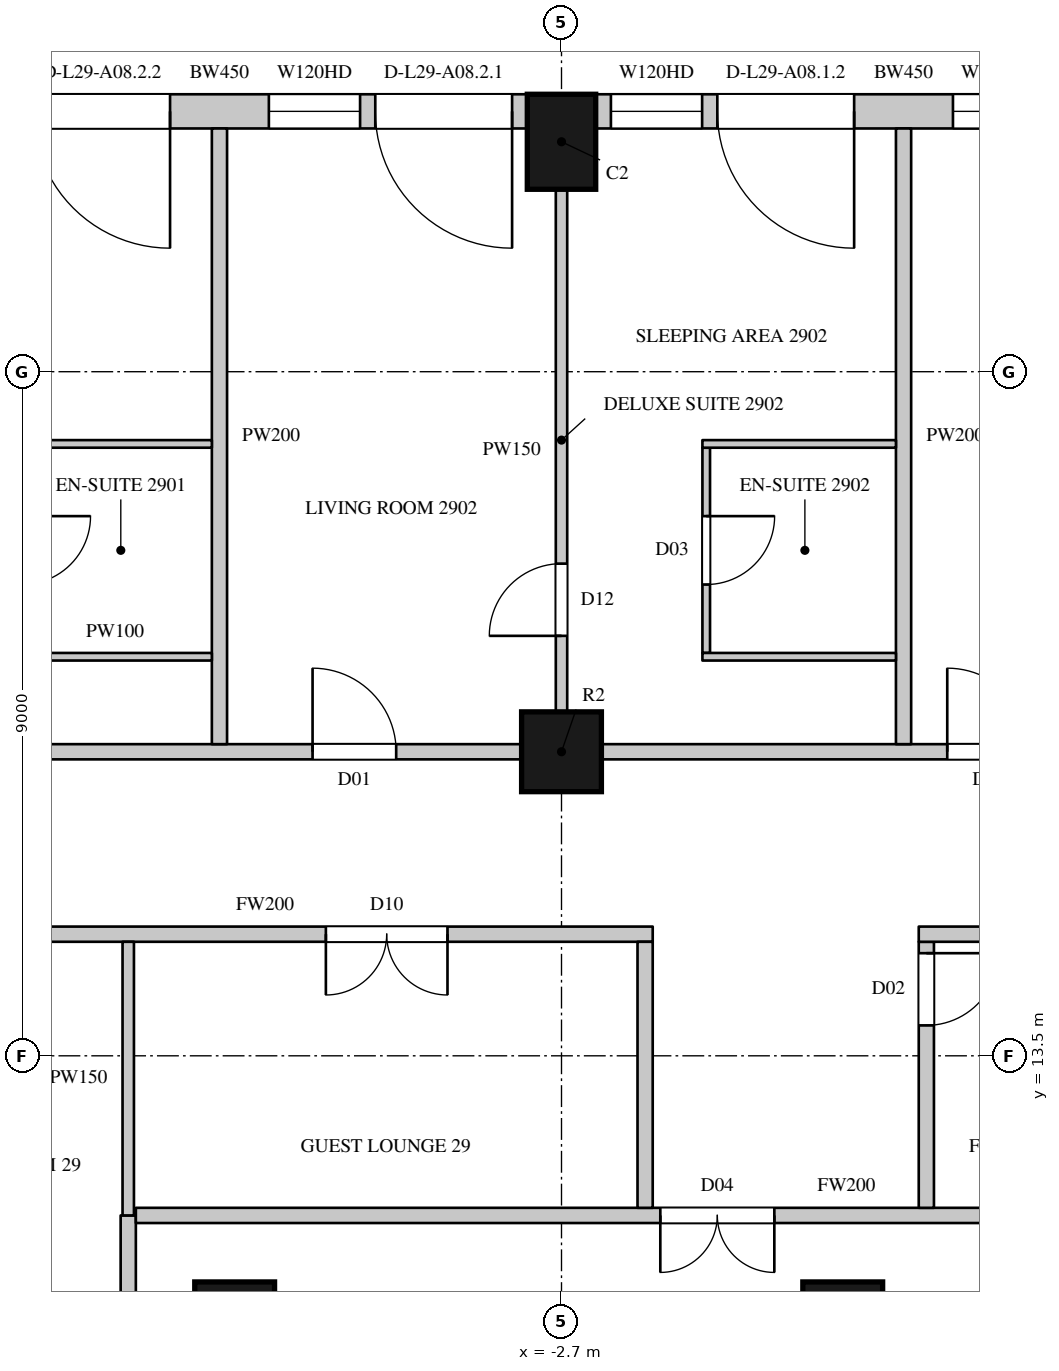
"""IFC4 building model, lengths in metres.
Left out: names, types, materials, properties, quantities, classifications, styles, units other than length and angle.
Written with IfcOpenShell. Run it as: python <this file> out.ifc"""

import sys

from ifc_helpers import new_model, si_unit, direction, frame, frame_2d, origin, origin_2d, place, context, subcontext, project, spatial, rectangle, circle, extrude, element, fill, save


model = new_model("IFC4")
c1 = context("Model", 3, precision=1e-05, world=origin(), true_north=direction((0.0, 1.0)))
c2 = subcontext(c1, "Body", "Model", "MODEL_VIEW")
j1 = project(units=[si_unit("LENGTHUNIT", "METRE"), si_unit("PLANEANGLEUNIT", "RADIAN")], contexts=[c1])
p1 = place(None, origin())
s1 = spatial("IfcSite", under=j1, at=p1, CompositionType="ELEMENT")
p2 = place(p1, origin())
s2 = spatial("IfcBuilding", under=s1, at=p2, CompositionType="ELEMENT")
p3 = place(p2, frame((0.0, 0.0, 134.7)))
s3 = spatial("IfcBuildingStorey", under=s2, at=p3, CompositionType="ELEMENT", Elevation=134.7)
p4 = place(p3, frame((-2.7, 25.525, 0.0), z_axis=(0.0, 0.0, 1.0), x_axis=(-1.0, 0.0, 0.0)))
e1 = element("IfcColumn", 1, at=p4, inside=s3, PredefinedType="COLUMN", context=c2, shape_type="SweptSolid", body=[
    extrude(rectangle(XDim=0.9, YDim=1.25, at=origin_2d()), origin(), (0.0, 0.0, 1.0), 3.6),
])
for number, where, z_axis, x_axis in (
    (2, (-2.7, 17.5, 0.0), (0.0, 0.0, 1.0), (1.0, 0.0, 0.0)),
    (3, (-7.0, 10.0, 0.0), (0.0, 0.0, 1.0), (1.0, 0.0, 0.0)),
    (4, (1.0, 10.0, 0.0), (0.0, 0.0, 1.0), (1.0, 0.0, 0.0)),
):
    element("IfcColumn", number, at=place(p3, frame(where, z_axis=z_axis, x_axis=x_axis)), inside=s3, PredefinedType="COLUMN", context=c2, shape_type="SweptSolid", body=[
        extrude(circle(Radius=0.525, at=origin_2d()), origin(), (0.0, 0.0, 1.0), 3.6),
    ])
p5 = place(p3, frame((5.85, 25.925, 0.0), z_axis=(0.0, 0.0, 1.0), x_axis=(-1.0, 0.0, 0.0)))
e5 = element("IfcWall", 5, at=p5, inside=s3, PredefinedType="SOLIDWALL", context=c2, shape_type="SweptSolid", body=[
    extrude(rectangle(XDim=8.1, YDim=0.45, at=frame_2d((4.05, 0.0))), origin(), (0.0, 0.0, 1.0), 3.3),
])
p6 = place(p5, frame((0.2, 0.0, 0.0)))
e6 = element("IfcOpeningElement", 6, at=p6, cuts=e5, PredefinedType="OPENING", context=c2, shape_type="SweptSolid", body=[
    extrude(rectangle(XDim=1.8, YDim=2.4, at=frame_2d((0.9, 1.2))), frame((0.0, 0.235, 0.0), z_axis=(0.0, -1.0, 0.0), x_axis=(1.0, 0.0, 0.0)), (0.0, 0.0, 1.0), 0.47),
])
p7 = place(p5, frame((2.2, 0.0, 1.05)))
e7 = element("IfcOpeningElement", 7, at=p7, cuts=e5, PredefinedType="OPENING", context=c2, shape_type="SweptSolid", body=[
    extrude(rectangle(XDim=1.2, YDim=2.0, at=frame_2d((0.6, 1.0))), frame((0.0, 0.235, 0.0), z_axis=(0.0, -1.0, 0.0), x_axis=(1.0, 0.0, 0.0)), (0.0, 0.0, 1.0), 0.47),
])
p8 = place(p5, frame((4.7, 0.0, 0.0)))
e8 = element("IfcOpeningElement", 8, at=p8, cuts=e5, PredefinedType="OPENING", context=c2, shape_type="SweptSolid", body=[
    extrude(rectangle(XDim=1.8, YDim=2.4, at=frame_2d((0.9, 1.2))), frame((0.0, 0.235, 0.0), z_axis=(0.0, -1.0, 0.0), x_axis=(1.0, 0.0, 0.0)), (0.0, 0.0, 1.0), 0.47),
])
p9 = place(p5, frame((6.7, 0.0, 1.05)))
e9 = element("IfcOpeningElement", 9, at=p9, cuts=e5, PredefinedType="OPENING", context=c2, shape_type="SweptSolid", body=[
    extrude(rectangle(XDim=1.2, YDim=2.0, at=frame_2d((0.6, 1.0))), frame((0.0, 0.235, 0.0), z_axis=(0.0, -1.0, 0.0), x_axis=(1.0, 0.0, 0.0)), (0.0, 0.0, 1.0), 0.47),
])
p10 = place(p3, frame((-3.15, 25.925, 0.0), z_axis=(0.0, 0.0, 1.0), x_axis=(-1.0, 0.0, 0.0)))
e10 = element("IfcWall", 10, at=p10, inside=s3, PredefinedType="SOLIDWALL", context=c2, shape_type="SweptSolid", body=[
    extrude(rectangle(XDim=8.1, YDim=0.45, at=frame_2d((4.05, 0.0))), origin(), (0.0, 0.0, 1.0), 3.3),
])
p11 = place(p10, frame((0.2, 0.0, 0.0)))
e11 = element("IfcOpeningElement", 11, at=p11, cuts=e10, PredefinedType="OPENING", context=c2, shape_type="SweptSolid", body=[
    extrude(rectangle(XDim=1.8, YDim=2.4, at=frame_2d((0.9, 1.2))), frame((0.0, 0.235, 0.0), z_axis=(0.0, -1.0, 0.0), x_axis=(1.0, 0.0, 0.0)), (0.0, 0.0, 1.0), 0.47),
])
p12 = place(p10, frame((2.2, 0.0, 1.05)))
e12 = element("IfcOpeningElement", 12, at=p12, cuts=e10, PredefinedType="OPENING", context=c2, shape_type="SweptSolid", body=[
    extrude(rectangle(XDim=1.2, YDim=2.0, at=frame_2d((0.6, 1.0))), frame((0.0, 0.235, 0.0), z_axis=(0.0, -1.0, 0.0), x_axis=(1.0, 0.0, 0.0)), (0.0, 0.0, 1.0), 0.47),
])
p13 = place(p10, frame((4.7, 0.0, 0.0)))
e13 = element("IfcOpeningElement", 13, at=p13, cuts=e10, PredefinedType="OPENING", context=c2, shape_type="SweptSolid", body=[
    extrude(rectangle(XDim=1.8, YDim=2.4, at=frame_2d((0.9, 1.2))), frame((0.0, 0.235, 0.0), z_axis=(0.0, -1.0, 0.0), x_axis=(1.0, 0.0, 0.0)), (0.0, 0.0, 1.0), 0.47),
])
p14 = place(p10, frame((6.7, 0.0, 1.05)))
e14 = element("IfcOpeningElement", 14, at=p14, cuts=e10, PredefinedType="OPENING", context=c2, shape_type="SweptSolid", body=[
    extrude(rectangle(XDim=1.2, YDim=2.0, at=frame_2d((0.6, 1.0))), frame((0.0, 0.235, 0.0), z_axis=(0.0, -1.0, 0.0), x_axis=(1.0, 0.0, 0.0)), (0.0, 0.0, 1.0), 0.47),
])
p15 = place(p3, frame((-11.175, 17.5, 0.0), z_axis=(0.0, 0.0, 1.0), x_axis=(1.0, 0.0, 0.0)))
e15 = element("IfcWall", 15, at=p15, inside=s3, PredefinedType="PARTITIONING", context=c2, shape_type="SweptSolid", body=[
    extrude(rectangle(XDim=7.95, YDim=0.2, at=frame_2d((3.975, 0.0))), origin(), (0.0, 0.0, 1.0), 2.75),
])
p16 = place(p15, frame((5.2, 0.0, 0.0)))
e16 = element("IfcOpeningElement", 16, at=p16, cuts=e15, PredefinedType="OPENING", context=c2, shape_type="SweptSolid", body=[
    extrude(rectangle(XDim=1.1, YDim=2.4, at=frame_2d((0.55, 1.2))), frame((0.0, 0.11, 0.0), z_axis=(0.0, -1.0, 0.0), x_axis=(1.0, 0.0, 0.0)), (0.0, 0.0, 1.0), 0.22),
])
p17 = place(p3, frame((-2.175, 17.5, 0.0), z_axis=(0.0, 0.0, 1.0), x_axis=(1.0, 0.0, 0.0)))
e17 = element("IfcWall", 17, at=p17, inside=s3, PredefinedType="PARTITIONING", context=c2, shape_type="SweptSolid", body=[
    extrude(rectangle(XDim=7.95, YDim=0.2, at=frame_2d((3.975, 0.0))), origin(), (0.0, 0.0, 1.0), 2.75),
])
p18 = place(p17, frame((4.55, 0.0, 0.0)))
e18 = element("IfcOpeningElement", 18, at=p18, cuts=e17, PredefinedType="OPENING", context=c2, shape_type="SweptSolid", body=[
    extrude(rectangle(XDim=1.1, YDim=2.4, at=frame_2d((0.55, 1.2))), frame((0.0, 0.11, 0.0), z_axis=(0.0, -1.0, 0.0), x_axis=(1.0, 0.0, 0.0)), (0.0, 0.0, 1.0), 0.22),
])
p19 = place(p3, frame((-11.7, 15.1, 0.0), z_axis=(0.0, 0.0, 1.0), x_axis=(1.0, 0.0, 0.0)))
e19 = element("IfcWall", 19, at=p19, inside=s3, PredefinedType="PARTITIONING", context=c2, shape_type="SweptSolid", body=[
    extrude(rectangle(XDim=10.2, YDim=0.2, at=frame_2d((5.1, 0.0))), origin(), (0.0, 0.0, 1.0), 3.3),
])
p20 = place(p19, frame((5.9, 0.0, 0.0)))
e20 = element("IfcOpeningElement", 20, at=p20, cuts=e19, PredefinedType="OPENING", context=c2, shape_type="SweptSolid", body=[
    extrude(rectangle(XDim=1.6, YDim=2.4, at=frame_2d((0.8, 1.2))), frame((0.0, 0.11, 0.0), z_axis=(0.0, -1.0, 0.0), x_axis=(1.0, 0.0, 0.0)), (0.0, 0.0, 1.0), 0.22),
])
p21 = place(p3, frame((-8.4, -11.3, 0.0), z_axis=(0.0, 0.0, 1.0), x_axis=(0.0, 1.0, 0.0)))
e21 = element("IfcWall", 21, at=p21, inside=s3, PredefinedType="PARTITIONING", context=c2, shape_type="SweptSolid", body=[
    extrude(rectangle(XDim=22.7, YDim=0.2, at=frame_2d((11.35, 0.0))), origin(), (0.0, 0.0, 1.0), 3.3),
])
p22 = place(p21, frame((15.05, 0.0, 0.0)))
e22 = element("IfcOpeningElement", 22, at=p22, cuts=e21, PredefinedType="OPENING", context=c2, shape_type="SweptSolid", body=[
    extrude(rectangle(XDim=1.5, YDim=2.2, at=frame_2d((0.75, 1.1))), frame((0.0, 0.11, 0.0), z_axis=(0.0, -1.0, 0.0), x_axis=(1.0, 0.0, 0.0)), (0.0, 0.0, 1.0), 0.22),
])
p23 = place(p3, frame((-8.3, 11.4, 0.0), z_axis=(0.0, 0.0, 1.0), x_axis=(1.0, 0.0, 0.0)))
e23 = element("IfcWall", 23, at=p23, inside=s3, PredefinedType="PARTITIONING", context=c2, shape_type="SweptSolid", body=[
    extrude(rectangle(XDim=18.7, YDim=0.2, at=frame_2d((9.35, 0.0))), origin(), (0.0, 0.0, 1.0), 3.3),
])
p24 = place(p23, frame((6.9, 0.0, 0.0)))
e24 = element("IfcOpeningElement", 24, at=p24, cuts=e23, PredefinedType="OPENING", context=c2, shape_type="SweptSolid", body=[
    extrude(rectangle(XDim=1.5, YDim=2.2, at=frame_2d((0.75, 1.1))), frame((0.0, 0.11, 0.0), z_axis=(0.0, -1.0, 0.0), x_axis=(1.0, 0.0, 0.0)), (0.0, 0.0, 1.0), 0.22),
])
p25 = place(p3, frame((-1.6, 11.5, 0.0), z_axis=(0.0, 0.0, 1.0), x_axis=(0.0, 1.0, 0.0)))
e25 = element("IfcWall", 25, at=p25, inside=s3, PredefinedType="PARTITIONING", context=c2, shape_type="SweptSolid", body=[
    extrude(rectangle(XDim=3.5, YDim=0.2, at=frame_2d((1.75, 0.0))), origin(), (0.0, 0.0, 1.0), 3.3),
])
p26 = place(p3, frame((2.1, 11.5, 0.0), z_axis=(0.0, 0.0, 1.0), x_axis=(0.0, 1.0, 0.0)))
e26 = element("IfcWall", 26, at=p26, inside=s3, PredefinedType="PARTITIONING", context=c2, shape_type="SweptSolid", body=[
    extrude(rectangle(XDim=3.5, YDim=0.2, at=frame_2d((1.75, 0.0))), origin(), (0.0, 0.0, 1.0), 3.3),
])
p27 = place(p26, frame((2.4, 0.0, 0.0)))
e27 = element("IfcOpeningElement", 27, at=p27, cuts=e26, PredefinedType="OPENING", context=c2, shape_type="SweptSolid", body=[
    extrude(rectangle(XDim=0.95, YDim=2.2, at=frame_2d((0.475, 1.1))), frame((0.0, 0.11, 0.0), z_axis=(0.0, -1.0, 0.0), x_axis=(1.0, 0.0, 0.0)), (0.0, 0.0, 1.0), 0.22),
])
p28 = place(p3, frame((2.0, 15.1, 0.0), z_axis=(0.0, 0.0, 1.0), x_axis=(1.0, 0.0, 0.0)))
e28 = element("IfcWall", 28, at=p28, inside=s3, PredefinedType="PARTITIONING", context=c2, shape_type="SweptSolid", body=[
    extrude(rectangle(XDim=11.8, YDim=0.2, at=frame_2d((5.9, 0.0))), origin(), (0.0, 0.0, 1.0), 3.3),
])
p29 = place(p28, frame((7.1, 0.0, 0.0)))
e29 = element("IfcOpeningElement", 29, at=p29, cuts=e28, PredefinedType="OPENING", context=c2, shape_type="SweptSolid", body=[
    extrude(rectangle(XDim=0.9, YDim=2.2, at=frame_2d((0.45, 1.1))), frame((0.0, 0.11, 0.0), z_axis=(0.0, -1.0, 0.0), x_axis=(1.0, 0.0, 0.0)), (0.0, 0.0, 1.0), 0.22),
])
p30 = place(p3, frame((-8.4, 11.4, 0.0), z_axis=(0.0, 0.0, 1.0), x_axis=(0.0, 1.0, 0.0)))
e30 = element("IfcWall", 30, at=p30, inside=s3, PredefinedType="PARTITIONING", context=c2, shape_type="SweptSolid", body=[
    extrude(rectangle(XDim=3.6, YDim=0.15, at=frame_2d((1.8, 0.0))), origin(), (0.0, 0.0, 1.0), 3.3),
])
p31 = place(p3, frame((-2.7, 18.025, 0.0), z_axis=(0.0, 0.0, 1.0), x_axis=(0.0, 1.0, 0.0)))
e31 = element("IfcWall", 31, at=p31, inside=s3, PredefinedType="PARTITIONING", context=c2, shape_type="SweptSolid", body=[
    extrude(rectangle(XDim=6.875, YDim=0.15, at=frame_2d((3.438, 0.0))), origin(), (0.0, 0.0, 1.0), 2.75),
])
p32 = place(p31, frame((1.0, 0.0, 0.0)))
e32 = element("IfcOpeningElement", 32, at=p32, cuts=e31, PredefinedType="OPENING", context=c2, shape_type="SweptSolid", body=[
    extrude(rectangle(XDim=0.95, YDim=2.2, at=frame_2d((0.475, 1.1))), frame((0.0, 0.085, 0.0), z_axis=(0.0, -1.0, 0.0), x_axis=(1.0, 0.0, 0.0)), (0.0, 0.0, 1.0), 0.17),
])
for number, where, z_axis, x_axis in (
    (33, (-7.2, 17.6, 0.0), (0.0, 0.0, 1.0), (0.0, 1.0, 0.0)),
    (34, (1.8, 17.6, 0.0), (0.0, 0.0, 1.0), (0.0, 1.0, 0.0)),
):
    element("IfcWall", number, at=place(p3, frame(where, z_axis=z_axis, x_axis=x_axis)), inside=s3, PredefinedType="PARTITIONING", context=c2, shape_type="SweptSolid", body=[
        extrude(rectangle(XDim=8.1, YDim=0.2, at=frame_2d((4.05, 0.0))), origin(), (0.0, 0.0, 1.0), 2.65),
    ])
for number, where, z_axis, x_axis in (
    (35, (-9.846, 18.75, 0.0), (0.0, 0.0, 1.0), (1.0, 0.0, 0.0)),
    (36, (-9.846, 21.55, 0.0), (0.0, 0.0, 1.0), (1.0, 0.0, 0.0)),
):
    element("IfcWall", number, at=place(p3, frame(where, z_axis=z_axis, x_axis=x_axis)), inside=s3, PredefinedType="PARTITIONING", context=c2, shape_type="SweptSolid", body=[
        extrude(rectangle(XDim=2.546, YDim=0.1, at=frame_2d((1.273, 0.0))), origin(), (0.0, 0.0, 1.0), 3.3),
    ])
p33 = place(p3, frame((-0.796, 18.8, 0.0), z_axis=(0.0, 0.0, 1.0), x_axis=(0.0, 1.0, 0.0)))
e37 = element("IfcWall", 37, at=p33, inside=s3, PredefinedType="PARTITIONING", context=c2, shape_type="SweptSolid", body=[
    extrude(rectangle(XDim=2.7, YDim=0.1, at=frame_2d((1.35, 0.0))), origin(), (0.0, 0.0, 1.0), 3.3),
])
p34 = place(p33, frame((0.9, 0.0, 0.0)))
e38 = element("IfcOpeningElement", 38, at=p34, cuts=e37, PredefinedType="OPENING", context=c2, shape_type="SweptSolid", body=[
    extrude(rectangle(XDim=0.9, YDim=2.2, at=frame_2d((0.45, 1.1))), frame((0.0, 0.06, 0.0), z_axis=(0.0, -1.0, 0.0), x_axis=(1.0, 0.0, 0.0)), (0.0, 0.0, 1.0), 0.12),
])
for number, where, z_axis, x_axis in (
    (39, (-0.846, 18.75, 0.0), (0.0, 0.0, 1.0), (1.0, 0.0, 0.0)),
    (40, (-0.846, 21.55, 0.0), (0.0, 0.0, 1.0), (1.0, 0.0, 0.0)),
):
    element("IfcWall", number, at=place(p3, frame(where, z_axis=z_axis, x_axis=x_axis)), inside=s3, PredefinedType="PARTITIONING", context=c2, shape_type="SweptSolid", body=[
        extrude(rectangle(XDim=2.546, YDim=0.1, at=frame_2d((1.273, 0.0))), origin(), (0.0, 0.0, 1.0), 3.3),
    ])
p35 = place(p7, origin())
e41 = element("IfcWindow", 41, at=p35, inside=s3, PartitioningType="SINGLE_PANEL", PredefinedType="WINDOW", context=c2, shape_type="SweptSolid", body=[
    extrude(rectangle(XDim=1.2, YDim=2.0, at=frame_2d((0.6, 1.0))), frame((0.0, 0.135, 0.0), z_axis=(0.0, -1.0, 0.0), x_axis=(1.0, 0.0, 0.0)), (0.0, 0.0, 1.0), 0.06),
])
fill(e7, e41)
p36 = place(p8, origin())
e42 = element("IfcDoor", 42, at=p36, inside=s3, OperationType="SLIDING_TO_LEFT", PredefinedType="DOOR", context=c2, shape_type="SweptSolid", body=[
    extrude(rectangle(XDim=1.8, YDim=2.4, at=frame_2d((0.9, 1.2))), frame((0.0, 0.13, 0.0), z_axis=(0.0, -1.0, 0.0), x_axis=(1.0, 0.0, 0.0)), (0.0, 0.0, 1.0), 0.05),
])
fill(e8, e42)
p37 = place(p9, origin())
e43 = element("IfcWindow", 43, at=p37, inside=s3, PartitioningType="SINGLE_PANEL", PredefinedType="WINDOW", context=c2, shape_type="SweptSolid", body=[
    extrude(rectangle(XDim=1.2, YDim=2.0, at=frame_2d((0.6, 1.0))), frame((0.0, 0.135, 0.0), z_axis=(0.0, -1.0, 0.0), x_axis=(1.0, 0.0, 0.0)), (0.0, 0.0, 1.0), 0.06),
])
fill(e9, e43)
p38 = place(p11, origin())
e44 = element("IfcDoor", 44, at=p38, inside=s3, OperationType="SLIDING_TO_LEFT", PredefinedType="DOOR", context=c2, shape_type="SweptSolid", body=[
    extrude(rectangle(XDim=1.8, YDim=2.4, at=frame_2d((0.9, 1.2))), frame((0.0, 0.13, 0.0), z_axis=(0.0, -1.0, 0.0), x_axis=(1.0, 0.0, 0.0)), (0.0, 0.0, 1.0), 0.05),
])
fill(e11, e44)
p39 = place(p12, origin())
e45 = element("IfcWindow", 45, at=p39, inside=s3, PartitioningType="SINGLE_PANEL", PredefinedType="WINDOW", context=c2, shape_type="SweptSolid", body=[
    extrude(rectangle(XDim=1.2, YDim=2.0, at=frame_2d((0.6, 1.0))), frame((0.0, 0.135, 0.0), z_axis=(0.0, -1.0, 0.0), x_axis=(1.0, 0.0, 0.0)), (0.0, 0.0, 1.0), 0.06),
])
fill(e12, e45)
p40 = place(p13, origin())
e46 = element("IfcDoor", 46, at=p40, inside=s3, OperationType="SLIDING_TO_LEFT", PredefinedType="DOOR", context=c2, shape_type="SweptSolid", body=[
    extrude(rectangle(XDim=1.8, YDim=2.4, at=frame_2d((0.9, 1.2))), frame((0.0, 0.13, 0.0), z_axis=(0.0, -1.0, 0.0), x_axis=(1.0, 0.0, 0.0)), (0.0, 0.0, 1.0), 0.05),
])
fill(e13, e46)
p41 = place(p24, origin())
e47 = element("IfcDoor", 47, at=p41, inside=s3, OperationType="DOUBLE_DOOR_SINGLE_SWING", PredefinedType="DOOR", context=c2, shape_type="SweptSolid", body=[
    extrude(rectangle(XDim=1.5, YDim=2.2, at=frame_2d((0.75, 1.1))), frame((0.0, 0.025, 0.0), z_axis=(0.0, -1.0, 0.0), x_axis=(1.0, 0.0, 0.0)), (0.0, 0.0, 1.0), 0.05),
])
fill(e24, e47)
p42 = place(p20, origin())
e48 = element("IfcDoor", 48, at=p42, inside=s3, OperationType="DOUBLE_DOOR_SINGLE_SWING", PredefinedType="DOOR", context=c2, shape_type="SweptSolid", body=[
    extrude(rectangle(XDim=1.6, YDim=2.4, at=frame_2d((0.8, 1.2))), frame((0.0, 0.025, 0.0), z_axis=(0.0, -1.0, 0.0), x_axis=(1.0, 0.0, 0.0)), (0.0, 0.0, 1.0), 0.05),
])
fill(e20, e48)
p43 = place(p27, origin())
e49 = element("IfcDoor", 49, at=p43, inside=s3, OperationType="SINGLE_SWING_LEFT", PredefinedType="DOOR", context=c2, shape_type="SweptSolid", body=[
    extrude(rectangle(XDim=0.95, YDim=2.2, at=frame_2d((0.475, 1.1))), frame((0.0, 0.025, 0.0), z_axis=(0.0, -1.0, 0.0), x_axis=(1.0, 0.0, 0.0)), (0.0, 0.0, 1.0), 0.05),
])
fill(e27, e49)
p44 = place(p16, origin())
e50 = element("IfcDoor", 50, at=p44, inside=s3, OperationType="SINGLE_SWING_LEFT", PredefinedType="DOOR", context=c2, shape_type="SweptSolid", body=[
    extrude(rectangle(XDim=1.1, YDim=2.4, at=frame_2d((0.55, 1.2))), frame((0.0, 0.025, 0.0), z_axis=(0.0, -1.0, 0.0), x_axis=(1.0, 0.0, 0.0)), (0.0, 0.0, 1.0), 0.05),
])
fill(e16, e50)
p45 = place(p32, origin())
e51 = element("IfcDoor", 51, at=p45, inside=s3, OperationType="SINGLE_SWING_LEFT", PredefinedType="DOOR", context=c2, shape_type="SweptSolid", body=[
    extrude(rectangle(XDim=0.95, YDim=2.2, at=frame_2d((0.475, 1.1))), frame((0.0, 0.025, 0.0), z_axis=(0.0, -1.0, 0.0), x_axis=(1.0, 0.0, 0.0)), (0.0, 0.0, 1.0), 0.05),
])
fill(e32, e51)
p46 = place(p34, origin())
e52 = element("IfcDoor", 52, at=p46, inside=s3, OperationType="SINGLE_SWING_LEFT", PredefinedType="DOOR", context=c2, shape_type="SweptSolid", body=[
    extrude(rectangle(XDim=0.9, YDim=2.2, at=frame_2d((0.45, 1.1))), frame((0.0, 0.025, 0.0), z_axis=(0.0, -1.0, 0.0), x_axis=(1.0, 0.0, 0.0)), (0.0, 0.0, 1.0), 0.05),
])
fill(e38, e52)
p47 = place(p18, origin())
e53 = element("IfcDoor", 53, at=p47, inside=s3, OperationType="SINGLE_SWING_LEFT", PredefinedType="DOOR", context=c2, shape_type="SweptSolid", body=[
    extrude(rectangle(XDim=1.1, YDim=2.4, at=frame_2d((0.55, 1.2))), frame((0.0, 0.025, 0.0), z_axis=(0.0, -1.0, 0.0), x_axis=(1.0, 0.0, 0.0)), (0.0, 0.0, 1.0), 0.05),
])
fill(e18, e53)
save(model, sys.argv[1])
